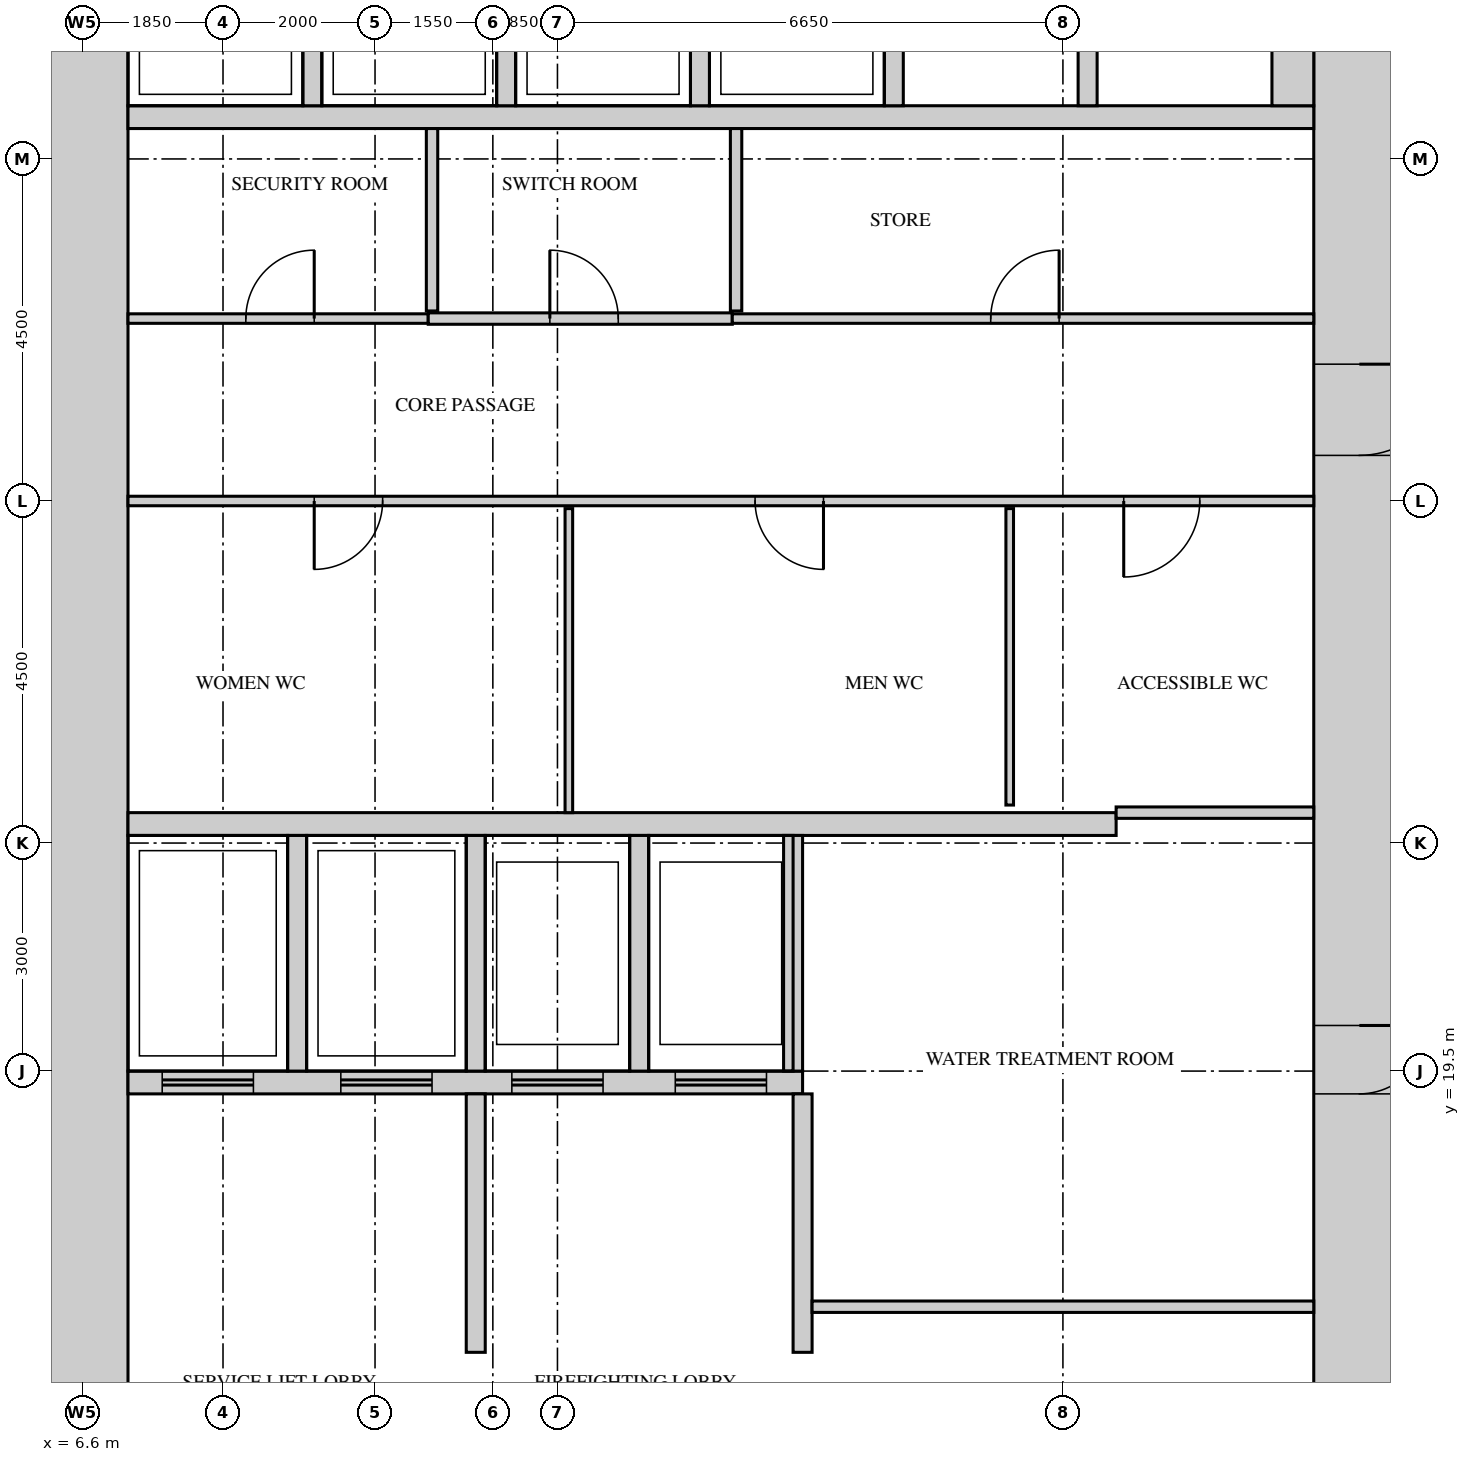
"""IFC4 building model, lengths in metres.
Left out: names, types, materials, properties, quantities, classifications, styles, units other than length and angle.
Written with IfcOpenShell. Run it as: python <this file> out.ifc"""

import sys

from ifc_helpers import new_model, si_unit, direction, frame, frame_2d, origin, place, context, subcontext, project, spatial, rectangle, extrude, source, transform, mapped, element, fill, save


model = new_model("IFC4")
c1 = context("Model", 3, precision=1e-05, world=origin(), true_north=direction((0.0, 1.0)))
c2 = subcontext(c1, "Body", "Model", "MODEL_VIEW")
j1 = project(units=[si_unit("LENGTHUNIT", "METRE"), si_unit("PLANEANGLEUNIT", "RADIAN")], contexts=[c1])
p1 = place(None, origin())
s1 = spatial("IfcSite", under=j1, at=p1, CompositionType="ELEMENT")
p2 = place(p1, origin())
s2 = spatial("IfcBuilding", under=s1, at=p2, CompositionType="ELEMENT")
p3 = place(p2, frame((0.0, 0.0, 78.0)))
s3 = spatial("IfcBuildingStorey", under=s2, at=p3, CompositionType="ELEMENT", Elevation=78.0)
m1 = source(origin(), c2, "Body", "SweptSolid", [
    extrude(rectangle(XDim=27.6, YDim=1.2, at=frame_2d((13.8, 0.0))), origin(), (0.0, 0.0, 1.0), 4.2),
])
p4 = place(p3, frame((23.4, 13.2, 0.0), z_axis=(0.0, 0.0, 1.0), x_axis=(0.0, 1.0, 0.0)))
e1 = element("IfcWall", 1, at=p4, inside=s3, PredefinedType="SHEAR", context=c2, shape_type="MappedRepresentation", body=[
    mapped(m1, transform((0.0, 0.0, 0.0))),
])
m2 = source(origin(), c2, "Body", "SweptSolid", [
    extrude(rectangle(XDim=1.8, YDim=2.1, at=frame_2d((0.9, 1.05))), frame((0.0, 0.61, 0.0), z_axis=(0.0, -1.0, 0.0), x_axis=(1.0, 0.0, 0.0)), (0.0, 0.0, 1.0), 1.22),
])
p5 = place(p4, frame((22.4, 0.0, 0.0)))
e2 = element("IfcOpeningElement", 2, at=p5, cuts=e1, PredefinedType="OPENING", context=c2, shape_type="MappedRepresentation", body=[
    mapped(m2, transform((0.0, 0.0, 0.0))),
])
m3 = source(origin(), c2, "Body", "SweptSolid", [
    extrude(rectangle(XDim=1.2, YDim=2.1, at=frame_2d((0.6, 1.05))), frame((0.0, 0.61, 0.0), z_axis=(0.0, -1.0, 0.0), x_axis=(1.0, 0.0, 0.0)), (0.0, 0.0, 1.0), 1.22),
])
p6 = place(p4, frame((14.4, 0.0, 0.0)))
e3 = element("IfcOpeningElement", 3, at=p6, cuts=e1, PredefinedType="OPENING", context=c2, shape_type="MappedRepresentation", body=[
    mapped(m3, transform((0.0, 0.0, 0.0))),
])
m4 = source(origin(), c2, "Body", "SweptSolid", [
    extrude(rectangle(XDim=0.9, YDim=2.1, at=frame_2d((0.45, 1.05))), frame((0.0, 0.61, 0.0), z_axis=(0.0, -1.0, 0.0), x_axis=(1.0, 0.0, 0.0)), (0.0, 0.0, 1.0), 1.22),
])
p7 = place(p4, frame((1.15, 0.0, 0.0)))
e4 = element("IfcOpeningElement", 4, at=p7, cuts=e1, PredefinedType="OPENING", context=c2, shape_type="MappedRepresentation", body=[
    mapped(m4, transform((0.0, 0.0, 0.0))),
])
p8 = place(p4, frame((6.0, 0.0, 0.0)))
e5 = element("IfcOpeningElement", 5, at=p8, cuts=e1, PredefinedType="OPENING", context=c2, shape_type="MappedRepresentation", body=[
    mapped(m4, transform((0.0, 0.0, 0.0))),
])
p9 = place(p3, frame((6.6, 13.2, 0.0), z_axis=(0.0, 0.0, 1.0), x_axis=(0.0, 1.0, 0.0)))
e6 = element("IfcWall", 6, at=p9, inside=s3, PredefinedType="SHEAR", context=c2, shape_type="MappedRepresentation", body=[
    mapped(m1, transform((0.0, 0.0, 0.0))),
])
m5 = source(origin(), c2, "Body", "SweptSolid", [
    extrude(rectangle(XDim=13.0, YDim=0.3, at=frame_2d((6.5, 0.0))), origin(), (0.0, 0.0, 1.0), 4.2),
])
p10 = place(p3, frame((7.2, 22.75, 0.0), z_axis=(0.0, 0.0, 1.0), x_axis=(1.0, 0.0, 0.0)))
e7 = element("IfcWall", 7, at=p10, inside=s3, PredefinedType="STANDARD", context=c2, shape_type="MappedRepresentation", body=[
    mapped(m5, transform((0.0, 0.0, 0.0))),
])
m6 = source(origin(), c2, "Body", "SweptSolid", [
    extrude(rectangle(XDim=8.875, YDim=0.3, at=frame_2d((4.438, 0.0))), origin(), (0.0, 0.0, 1.0), 4.2),
])
p11 = place(p3, frame((7.2, 19.35, 0.0), z_axis=(0.0, 0.0, 1.0), x_axis=(1.0, 0.0, 0.0)))
e8 = element("IfcWall", 8, at=p11, inside=s3, PredefinedType="STANDARD", context=c2, shape_type="MappedRepresentation", body=[
    mapped(m6, transform((0.0, 0.0, 0.0))),
])
m7 = source(origin(), c2, "Body", "SweptSolid", [
    extrude(rectangle(XDim=1.2, YDim=2.1, at=frame_2d((0.6, 1.05))), frame((0.0, 0.16, 0.0), z_axis=(0.0, -1.0, 0.0), x_axis=(1.0, 0.0, 0.0)), (0.0, 0.0, 1.0), 0.32),
])
p12 = place(p11, frame((0.45, 0.0, 0.0)))
e9 = element("IfcOpeningElement", 9, at=p12, cuts=e8, PredefinedType="OPENING", context=c2, shape_type="MappedRepresentation", body=[
    mapped(m7, transform((0.0, 0.0, 0.0))),
])
p13 = place(p11, frame((2.8, 0.0, 0.0)))
e10 = element("IfcOpeningElement", 10, at=p13, cuts=e8, PredefinedType="OPENING", context=c2, shape_type="MappedRepresentation", body=[
    mapped(m7, transform((0.0, 0.0, 0.0))),
])
p14 = place(p11, frame((5.05, 0.0, 0.0)))
e11 = element("IfcOpeningElement", 11, at=p14, cuts=e8, PredefinedType="OPENING", context=c2, shape_type="MappedRepresentation", body=[
    mapped(m7, transform((0.0, 0.0, 0.0))),
])
p15 = place(p11, frame((7.2, 0.0, 0.0)))
e12 = element("IfcOpeningElement", 12, at=p15, cuts=e8, PredefinedType="OPENING", context=c2, shape_type="MappedRepresentation", body=[
    mapped(m7, transform((0.0, 0.0, 0.0))),
])
m8 = source(origin(), c2, "Body", "SweptSolid", [
    extrude(rectangle(XDim=15.6, YDim=0.3, at=frame_2d((7.8, 0.0))), origin(), (0.0, 0.0, 1.0), 4.2),
])
p16 = place(p3, frame((7.2, 32.05, 0.0), z_axis=(0.0, 0.0, 1.0), x_axis=(1.0, 0.0, 0.0)))
e13 = element("IfcWall", 13, at=p16, inside=s3, PredefinedType="STANDARD", context=c2, shape_type="MappedRepresentation", body=[
    mapped(m8, transform((0.0, 0.0, 0.0))),
])
m9 = source(origin(), c2, "Body", "SweptSolid", [
    extrude(rectangle(XDim=3.1, YDim=0.25, at=frame_2d((1.55, 0.0))), origin(), (0.0, 0.0, 1.0), 4.2),
])
for number, where, z_axis, x_axis in (
    (14, (9.425, 19.5, 0.0), (0.0, 0.0, 1.0), (0.0, 1.0, 0.0)),
    (15, (11.775, 19.5, 0.0), (0.0, 0.0, 1.0), (0.0, 1.0, 0.0)),
    (16, (13.925, 19.5, 0.0), (0.0, 0.0, 1.0), (0.0, 1.0, 0.0)),
    (17, (15.95, 19.5, 0.0), (0.0, 0.0, 1.0), (0.0, 1.0, 0.0)),
):
    element("IfcWall", number, at=place(p3, frame(where, z_axis=z_axis, x_axis=x_axis)), inside=s3, PredefinedType="STANDARD", context=c2, shape_type="MappedRepresentation", body=[
        mapped(m9, transform((0.0, 0.0, 0.0))),
    ])
m10 = source(origin(), c2, "Body", "SweptSolid", [
    extrude(rectangle(XDim=2.4, YDim=0.25, at=frame_2d((1.2, 0.0))), origin(), (0.0, 0.0, 1.0), 4.2),
])
for number, where, z_axis, x_axis in (
    (18, (9.625, 32.2, 0.0), (0.0, 0.0, 1.0), (0.0, 1.0, 0.0)),
    (19, (12.175, 32.2, 0.0), (0.0, 0.0, 1.0), (0.0, 1.0, 0.0)),
    (20, (14.725, 32.2, 0.0), (0.0, 0.0, 1.0), (0.0, 1.0, 0.0)),
    (21, (17.275, 32.2, 0.0), (0.0, 0.0, 1.0), (0.0, 1.0, 0.0)),
    (22, (19.825, 32.2, 0.0), (0.0, 0.0, 1.0), (0.0, 1.0, 0.0)),
):
    element("IfcWall", number, at=place(p3, frame(where, z_axis=z_axis, x_axis=x_axis)), inside=s3, PredefinedType="STANDARD", context=c2, shape_type="MappedRepresentation", body=[
        mapped(m10, transform((0.0, 0.0, 0.0))),
    ])
m11 = source(origin(), c2, "Body", "SweptSolid", [
    extrude(rectangle(XDim=2.4, YDim=0.55, at=frame_2d((1.2, 0.0))), origin(), (0.0, 0.0, 1.0), 4.2),
])
p17 = place(p3, frame((22.525, 32.2, 0.0), z_axis=(0.0, 0.0, 1.0), x_axis=(0.0, 1.0, 0.0)))
e23 = element("IfcWall", 23, at=p17, inside=s3, PredefinedType="STANDARD", context=c2, shape_type="MappedRepresentation", body=[
    mapped(m11, transform((0.0, 0.0, 0.0))),
])
m12 = source(origin(), c2, "Body", "SweptSolid", [
    extrude(rectangle(XDim=3.4, YDim=0.25, at=frame_2d((1.7, 0.0))), origin(), (0.0, 0.0, 1.0), 4.2),
])
for number, where, z_axis, x_axis in (
    (24, (16.075, 15.8, 0.0), (0.0, 0.0, 1.0), (0.0, 1.0, 0.0)),
    (25, (11.775, 15.8, 0.0), (0.0, 0.0, 1.0), (0.0, 1.0, 0.0)),
):
    element("IfcWall", number, at=place(p3, frame(where, z_axis=z_axis, x_axis=x_axis)), inside=s3, PredefinedType="STANDARD", context=c2, shape_type="MappedRepresentation", body=[
        mapped(m12, transform((0.0, 0.0, 0.0))),
    ])
m13 = source(origin(), c2, "Body", "SweptSolid", [
    extrude(rectangle(XDim=6.6, YDim=0.15, at=frame_2d((3.3, 0.0))), origin(), (0.0, 0.0, 1.0), 4.3),
])
p18 = place(p3, frame((16.2, 16.4, 0.0), z_axis=(0.0, 0.0, 1.0), x_axis=(1.0, 0.0, 0.0)))
e26 = element("IfcWall", 26, at=p18, inside=s3, PredefinedType="PARTITIONING", context=c2, shape_type="MappedRepresentation", body=[
    mapped(m13, transform((0.0, 0.0, 0.0))),
])
m14 = source(origin(), c2, "Body", "SweptSolid", [
    extrude(rectangle(XDim=4.0, YDim=0.1, at=frame_2d((2.0, 0.0))), origin(), (0.0, 0.0, 1.0), 4.3),
])
p19 = place(p3, frame((13.0, 22.9, 0.0), z_axis=(0.0, 0.0, 1.0), x_axis=(0.0, 1.0, 0.0)))
e27 = element("IfcWall", 27, at=p19, inside=s3, PredefinedType="PARTITIONING", context=c2, shape_type="MappedRepresentation", body=[
    mapped(m14, transform((0.0, 0.0, 0.0))),
])
m15 = source(origin(), c2, "Body", "SweptSolid", [
    extrude(rectangle(XDim=2.6, YDim=0.15, at=frame_2d((1.3, 0.0))), origin(), (0.0, 0.0, 1.0), 4.3),
])
p20 = place(p3, frame((20.2, 22.9, 0.0), z_axis=(0.0, 0.0, 1.0), x_axis=(1.0, 0.0, 0.0)))
e28 = element("IfcWall", 28, at=p20, inside=s3, PredefinedType="PARTITIONING", context=c2, shape_type="MappedRepresentation", body=[
    mapped(m15, transform((0.0, 0.0, 0.0))),
])
m16 = source(origin(), c2, "Body", "SweptSolid", [
    extrude(rectangle(XDim=3.9, YDim=0.1, at=frame_2d((1.95, 0.0))), origin(), (0.0, 0.0, 1.0), 4.3),
])
p21 = place(p3, frame((18.8, 23.0, 0.0), z_axis=(0.0, 0.0, 1.0), x_axis=(0.0, 1.0, 0.0)))
e29 = element("IfcWall", 29, at=p21, inside=s3, PredefinedType="PARTITIONING", context=c2, shape_type="MappedRepresentation", body=[
    mapped(m16, transform((0.0, 0.0, 0.0))),
])
m17 = source(origin(), c2, "Body", "SweptSolid", [
    extrude(rectangle(XDim=15.6, YDim=0.125, at=frame_2d((7.8, 0.0))), origin(), (0.0, 0.0, 1.0), 4.3),
])
p22 = place(p3, frame((7.2, 27.0, 0.0), z_axis=(0.0, 0.0, 1.0), x_axis=(1.0, 0.0, 0.0)))
e30 = element("IfcWall", 30, at=p22, inside=s3, PredefinedType="PARTITIONING", context=c2, shape_type="MappedRepresentation", body=[
    mapped(m17, transform((0.0, 0.0, 0.0))),
])
m18 = source(origin(), c2, "Body", "SweptSolid", [
    extrude(rectangle(XDim=0.9, YDim=2.1, at=frame_2d((0.45, 1.05))), frame((0.0, 0.073, 0.0), z_axis=(0.0, -1.0, 0.0), x_axis=(1.0, 0.0, 0.0)), (0.0, 0.0, 1.0), 0.145),
])
p23 = place(p22, frame((2.45, 0.0, 0.0)))
e31 = element("IfcOpeningElement", 31, at=p23, cuts=e30, PredefinedType="OPENING", context=c2, shape_type="MappedRepresentation", body=[
    mapped(m18, transform((0.0, 0.0, 0.0))),
])
p24 = place(p22, frame((8.25, 0.0, 0.0)))
e32 = element("IfcOpeningElement", 32, at=p24, cuts=e30, PredefinedType="OPENING", context=c2, shape_type="MappedRepresentation", body=[
    mapped(m18, transform((0.0, 0.0, 0.0))),
])
m19 = source(origin(), c2, "Body", "SweptSolid", [
    extrude(rectangle(XDim=1.0, YDim=2.1, at=frame_2d((0.5, 1.05))), frame((0.0, 0.073, 0.0), z_axis=(0.0, -1.0, 0.0), x_axis=(1.0, 0.0, 0.0)), (0.0, 0.0, 1.0), 0.145),
])
p25 = place(p22, frame((13.1, 0.0, 0.0)))
e33 = element("IfcOpeningElement", 33, at=p25, cuts=e30, PredefinedType="OPENING", context=c2, shape_type="MappedRepresentation", body=[
    mapped(m19, transform((0.0, 0.0, 0.0))),
])
m20 = source(origin(), c2, "Body", "SweptSolid", [
    extrude(rectangle(XDim=3.95, YDim=0.125, at=frame_2d((1.975, 0.0))), origin(), (0.0, 0.0, 1.0), 4.3),
])
p26 = place(p3, frame((7.2, 29.4, 0.0), z_axis=(0.0, 0.0, 1.0), x_axis=(1.0, 0.0, 0.0)))
e34 = element("IfcWall", 34, at=p26, inside=s3, PredefinedType="PARTITIONING", context=c2, shape_type="MappedRepresentation", body=[
    mapped(m20, transform((0.0, 0.0, 0.0))),
])
p27 = place(p26, frame((1.55, 0.0, 0.0)))
e35 = element("IfcOpeningElement", 35, at=p27, cuts=e34, PredefinedType="OPENING", context=c2, shape_type="MappedRepresentation", body=[
    mapped(m18, transform((0.0, 0.0, 0.0))),
])
m21 = source(origin(), c2, "Body", "SweptSolid", [
    extrude(rectangle(XDim=4.0, YDim=0.15, at=frame_2d((2.0, 0.0))), origin(), (0.0, 0.0, 1.0), 4.3),
])
p28 = place(p3, frame((11.15, 29.4, 0.0), z_axis=(0.0, 0.0, 1.0), x_axis=(1.0, 0.0, 0.0)))
e36 = element("IfcWall", 36, at=p28, inside=s3, PredefinedType="PARTITIONING", context=c2, shape_type="MappedRepresentation", body=[
    mapped(m21, transform((0.0, 0.0, 0.0))),
])
m22 = source(origin(), c2, "Body", "SweptSolid", [
    extrude(rectangle(XDim=0.9, YDim=2.1, at=frame_2d((0.45, 1.05))), frame((0.0, 0.085, 0.0), z_axis=(0.0, -1.0, 0.0), x_axis=(1.0, 0.0, 0.0)), (0.0, 0.0, 1.0), 0.17),
])
p29 = place(p28, frame((1.6, 0.0, 0.0)))
e37 = element("IfcOpeningElement", 37, at=p29, cuts=e36, PredefinedType="OPENING", context=c2, shape_type="MappedRepresentation", body=[
    mapped(m22, transform((0.0, 0.0, 0.0))),
])
m23 = source(origin(), c2, "Body", "SweptSolid", [
    extrude(rectangle(XDim=7.65, YDim=0.125, at=frame_2d((3.825, 0.0))), origin(), (0.0, 0.0, 1.0), 4.3),
])
p30 = place(p3, frame((15.15, 29.4, 0.0), z_axis=(0.0, 0.0, 1.0), x_axis=(1.0, 0.0, 0.0)))
e38 = element("IfcWall", 38, at=p30, inside=s3, PredefinedType="PARTITIONING", context=c2, shape_type="MappedRepresentation", body=[
    mapped(m23, transform((0.0, 0.0, 0.0))),
])
p31 = place(p30, frame((3.4, 0.0, 0.0)))
e39 = element("IfcOpeningElement", 39, at=p31, cuts=e38, PredefinedType="OPENING", context=c2, shape_type="MappedRepresentation", body=[
    mapped(m18, transform((0.0, 0.0, 0.0))),
])
m24 = source(origin(), c2, "Body", "SweptSolid", [
    extrude(rectangle(XDim=2.4, YDim=0.15, at=frame_2d((1.2, 0.0))), origin(), (0.0, 0.0, 1.0), 4.3),
])
for number, where, z_axis, x_axis in (
    (40, (11.2, 29.5, 0.0), (0.0, 0.0, 1.0), (0.0, 1.0, 0.0)),
    (41, (15.2, 29.5, 0.0), (0.0, 0.0, 1.0), (0.0, 1.0, 0.0)),
):
    element("IfcWall", number, at=place(p3, frame(where, z_axis=z_axis, x_axis=x_axis)), inside=s3, PredefinedType="PARTITIONING", context=c2, shape_type="MappedRepresentation", body=[
        mapped(m24, transform((0.0, 0.0, 0.0))),
    ])
m25 = source(origin(), c2, "Body", "SweptSolid", [
    extrude(rectangle(XDim=1.2, YDim=2.1, at=frame_2d((0.6, 1.05))), frame((0.0, 0.55, 0.0), z_axis=(0.0, -1.0, 0.0), x_axis=(1.0, 0.0, 0.0)), (0.0, 0.0, 1.0), 1.1),
])
p32 = place(p6, origin())
e42 = element("IfcDoor", 42, at=p32, inside=s3, OperationType="SINGLE_SWING_RIGHT", PredefinedType="DOOR", context=c2, shape_type="MappedRepresentation", body=[
    mapped(m25, transform((0.0, 0.0, 0.0))),
])
fill(e3, e42)
m26 = source(origin(), c2, "Body", "SweptSolid", [
    extrude(rectangle(XDim=0.9, YDim=2.1, at=frame_2d((0.45, 1.05))), frame((0.0, 0.025, 0.0), z_axis=(0.0, -1.0, 0.0), x_axis=(1.0, 0.0, 0.0)), (0.0, 0.0, 1.0), 0.05),
])
p33 = place(p27, origin())
e43 = element("IfcDoor", 43, at=p33, inside=s3, OperationType="SINGLE_SWING_LEFT", PredefinedType="DOOR", context=c2, shape_type="MappedRepresentation", body=[
    mapped(m26, transform((0.0, 0.0, 0.0))),
])
fill(e35, e43)
p34 = place(p29, origin())
e44 = element("IfcDoor", 44, at=p34, inside=s3, OperationType="SINGLE_SWING_RIGHT", PredefinedType="DOOR", context=c2, shape_type="MappedRepresentation", body=[
    mapped(m26, transform((0.0, 0.0, 0.0))),
])
fill(e37, e44)
p35 = place(p31, origin())
e45 = element("IfcDoor", 45, at=p35, inside=s3, OperationType="SINGLE_SWING_LEFT", PredefinedType="DOOR", context=c2, shape_type="MappedRepresentation", body=[
    mapped(m26, transform((0.0, 0.0, 0.0))),
])
fill(e39, e45)
p36 = place(p23, origin())
e46 = element("IfcDoor", 46, at=p36, inside=s3, OperationType="SINGLE_SWING_LEFT", PredefinedType="DOOR", context=c2, shape_type="MappedRepresentation", body=[
    mapped(m26, transform((0.0, 0.0, 0.0))),
])
fill(e31, e46)
p37 = place(p24, origin())
e47 = element("IfcDoor", 47, at=p37, inside=s3, OperationType="SINGLE_SWING_RIGHT", PredefinedType="DOOR", context=c2, shape_type="MappedRepresentation", body=[
    mapped(m26, transform((0.0, 0.0, 0.0))),
])
fill(e32, e47)
m27 = source(origin(), c2, "Body", "SweptSolid", [
    extrude(rectangle(XDim=1.0, YDim=2.1, at=frame_2d((0.5, 1.05))), frame((0.0, 0.025, 0.0), z_axis=(0.0, -1.0, 0.0), x_axis=(1.0, 0.0, 0.0)), (0.0, 0.0, 1.0), 0.05),
])
p38 = place(p25, origin())
e48 = element("IfcDoor", 48, at=p38, inside=s3, OperationType="SINGLE_SWING_LEFT", PredefinedType="DOOR", context=c2, shape_type="MappedRepresentation", body=[
    mapped(m27, transform((0.0, 0.0, 0.0))),
])
fill(e33, e48)
m28 = source(origin(), c2, "Body", "SweptSolid", [
    extrude(rectangle(XDim=0.9, YDim=2.1, at=frame_2d((0.45, 1.05))), frame((0.0, 0.55, 0.0), z_axis=(0.0, -1.0, 0.0), x_axis=(1.0, 0.0, 0.0)), (0.0, 0.0, 1.0), 1.1),
])
p39 = place(p8, origin())
e49 = element("IfcDoor", 49, at=p39, inside=s3, OperationType="SINGLE_SWING_RIGHT", PredefinedType="DOOR", context=c2, shape_type="MappedRepresentation", body=[
    mapped(m28, transform((0.0, 0.0, 0.0))),
])
fill(e5, e49)
m29 = source(origin(), c2, "Body", "SweptSolid", [
    extrude(rectangle(XDim=1.2, YDim=2.1, at=frame_2d((0.6, 1.05))), frame((0.0, 0.025, 0.0), z_axis=(0.0, -1.0, 0.0), x_axis=(1.0, 0.0, 0.0)), (0.0, 0.0, 1.0), 0.05),
])
p40 = place(p12, origin())
e50 = element("IfcDoor", 50, at=p40, inside=s3, OperationType="DOUBLE_DOOR_SLIDING", PredefinedType="DOOR", context=c2, shape_type="MappedRepresentation", body=[
    mapped(m29, transform((0.0, 0.0, 0.0))),
])
fill(e9, e50)
p41 = place(p13, origin())
e51 = element("IfcDoor", 51, at=p41, inside=s3, OperationType="DOUBLE_DOOR_SLIDING", PredefinedType="DOOR", context=c2, shape_type="MappedRepresentation", body=[
    mapped(m29, transform((0.0, 0.0, 0.0))),
])
fill(e10, e51)
p42 = place(p14, origin())
e52 = element("IfcDoor", 52, at=p42, inside=s3, OperationType="DOUBLE_DOOR_SLIDING", PredefinedType="DOOR", context=c2, shape_type="MappedRepresentation", body=[
    mapped(m29, transform((0.0, 0.0, 0.0))),
])
fill(e11, e52)
p43 = place(p15, origin())
e53 = element("IfcDoor", 53, at=p43, inside=s3, OperationType="DOUBLE_DOOR_SLIDING", PredefinedType="DOOR", context=c2, shape_type="MappedRepresentation", body=[
    mapped(m29, transform((0.0, 0.0, 0.0))),
])
fill(e12, e53)
save(model, sys.argv[1])
